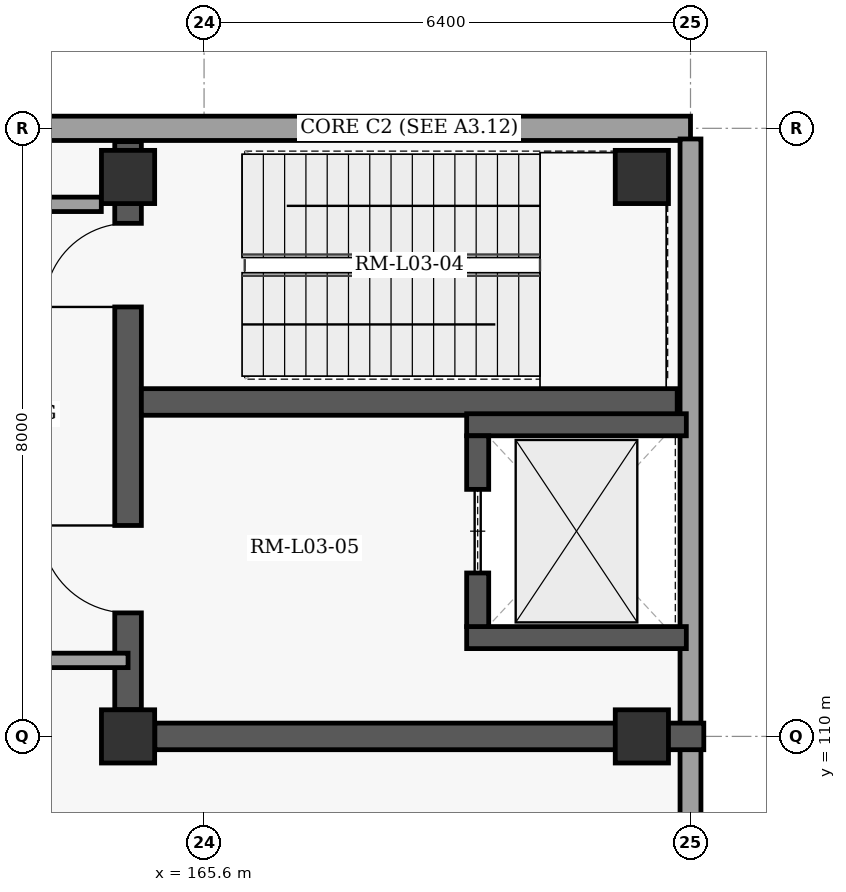
"""IFC4 building model, lengths in metres.
Left out: names, types, materials, properties, quantities, classifications, styles, units other than length and angle.
Written with IfcOpenShell. Run it as: python <this file> out.ifc"""

import sys

from ifc_helpers import new_model, si_unit, direction, frame, frame_2d, origin, origin_2d, place, context, subcontext, project, spatial, rectangle, extrude, element, fill, save


model = new_model("IFC4")
c1 = context("Model", 3, precision=1e-05, world=origin(), true_north=direction((0.0, 1.0)))
c2 = subcontext(c1, "Body", "Model", "MODEL_VIEW")
j1 = project(units=[si_unit("LENGTHUNIT", "METRE"), si_unit("PLANEANGLEUNIT", "RADIAN")], contexts=[c1])
p1 = place(None, origin())
s1 = spatial("IfcSite", under=j1, at=p1, CompositionType="ELEMENT")
p2 = place(p1, origin())
s2 = spatial("IfcBuilding", under=s1, at=p2, CompositionType="ELEMENT")
p3 = place(p2, frame((0.0, 0.0, 15.6)))
s3 = spatial("IfcBuildingStorey", under=s2, at=p3, CompositionType="ELEMENT", Elevation=15.6)
for number, where, z_axis, x_axis in (
    (1, (164.6, 110.0, 0.0), (0.0, 0.0, 1.0), (1.0, 0.0, 0.0)),
    (2, (164.6, 117.36, 0.0), (0.0, 0.0, 1.0), (1.0, 0.0, 0.0)),
    (3, (171.36, 110.0, 0.0), (0.0, 0.0, 1.0), (1.0, 0.0, 0.0)),
    (4, (171.36, 117.36, 0.0), (0.0, 0.0, 1.0), (1.0, 0.0, 0.0)),
):
    element("IfcColumn", number, at=place(p3, frame(where, z_axis=z_axis, x_axis=x_axis)), inside=s3, PredefinedType="COLUMN", context=c2, shape_type="SweptSolid", body=[
        extrude(rectangle(XDim=0.7, YDim=0.7, at=origin_2d()), origin(), (0.0, 0.0, 1.0), 4.8),
    ])
p4 = place(p3, frame((139.6, 118.0, 0.0), z_axis=(0.0, 0.0, 1.0), x_axis=(1.0, 0.0, 0.0)))
e5 = element("IfcWall", 5, at=p4, inside=s3, PredefinedType="SOLIDWALL", context=c2, shape_type="SweptSolid", body=[
    extrude(rectangle(XDim=32.4, YDim=0.32, at=frame_2d((16.2, 0.0))), origin(), (0.0, 0.0, 1.0), 4.58),
])
p5 = place(p4, frame((2.2, 0.0, 0.9)))
e6 = element("IfcOpeningElement", 6, at=p5, cuts=e5, PredefinedType="OPENING", context=c2, shape_type="SweptSolid", body=[
    extrude(rectangle(XDim=2.6, YDim=1.75, at=frame_2d((1.3, 0.875))), frame((0.0, 0.17, 0.0), z_axis=(0.0, -1.0, 0.0), x_axis=(1.0, 0.0, 0.0)), (0.0, 0.0, 1.0), 0.34),
])
p6 = place(p4, frame((7.96, 0.0, 0.9)))
e7 = element("IfcOpeningElement", 7, at=p6, cuts=e5, PredefinedType="OPENING", context=c2, shape_type="SweptSolid", body=[
    extrude(rectangle(XDim=2.8, YDim=1.8, at=frame_2d((1.4, 0.9))), frame((0.0, 0.17, 0.0), z_axis=(0.0, -1.0, 0.0), x_axis=(1.0, 0.0, 0.0)), (0.0, 0.0, 1.0), 0.34),
])
p7 = place(p4, frame((12.97, 0.0, 0.9)))
e8 = element("IfcOpeningElement", 8, at=p7, cuts=e5, PredefinedType="OPENING", context=c2, shape_type="SweptSolid", body=[
    extrude(rectangle(XDim=3.0, YDim=1.8, at=frame_2d((1.5, 0.9))), frame((0.0, 0.17, 0.0), z_axis=(0.0, -1.0, 0.0), x_axis=(1.0, 0.0, 0.0)), (0.0, 0.0, 1.0), 0.34),
])
p8 = place(p4, frame((19.48, 0.0, 0.9)))
e9 = element("IfcOpeningElement", 9, at=p8, cuts=e5, PredefinedType="OPENING", context=c2, shape_type="SweptSolid", body=[
    extrude(rectangle(XDim=1.6, YDim=1.65, at=frame_2d((0.8, 0.825))), frame((0.0, 0.17, 0.0), z_axis=(0.0, -1.0, 0.0), x_axis=(1.0, 0.0, 0.0)), (0.0, 0.0, 1.0), 0.34),
])
p9 = place(p3, frame((172.0, 117.86, 0.0), z_axis=(0.0, 0.0, 1.0), x_axis=(0.0, -1.0, 0.0)))
e10 = element("IfcWall", 10, at=p9, inside=s3, PredefinedType="SOLIDWALL", context=c2, shape_type="SweptSolid", body=[
    extrude(rectangle(XDim=46.12, YDim=0.275, at=frame_2d((23.06, 0.0))), origin(), (0.0, 0.0, 1.0), 4.58),
])
p10 = place(p3, frame((164.952, 110.0, 0.0), z_axis=(0.0, 0.0, 1.0), x_axis=(1.0, 0.0, 0.0)))
e11 = element("IfcWall", 11, at=p10, inside=s3, PredefinedType="SHEAR", context=c2, shape_type="SweptSolid", body=[
    extrude(rectangle(XDim=7.223, YDim=0.35, at=frame_2d((3.612, 0.0))), origin(), (0.0, 0.0, 1.0), 4.58),
])
p11 = place(p3, frame((164.6, 110.352, 0.0), z_axis=(0.0, 0.0, 1.0), x_axis=(0.0, 1.0, 0.0)))
e12 = element("IfcWall", 12, at=p11, inside=s3, PredefinedType="SHEAR", context=c2, shape_type="SweptSolid", body=[
    extrude(rectangle(XDim=7.473, YDim=0.35, at=frame_2d((3.736, 0.0))), origin(), (0.0, 0.0, 1.0), 4.58),
])
p12 = place(p11, frame((5.298, 0.0, 0.0)))
e13 = element("IfcOpeningElement", 13, at=p12, cuts=e12, PredefinedType="OPENING", context=c2, shape_type="SweptSolid", body=[
    extrude(rectangle(XDim=1.1, YDim=2.15, at=frame_2d((0.55, 1.075))), frame((0.0, 0.185, 0.0), z_axis=(0.0, -1.0, 0.0), x_axis=(1.0, 0.0, 0.0)), (0.0, 0.0, 1.0), 0.37),
])
p13 = place(p11, frame((1.273, 0.0, 0.0)))
e14 = element("IfcOpeningElement", 14, at=p13, cuts=e12, PredefinedType="OPENING", context=c2, shape_type="SweptSolid", body=[
    extrude(rectangle(XDim=1.15, YDim=2.2, at=frame_2d((0.575, 1.1))), frame((0.0, 0.185, 0.0), z_axis=(0.0, -1.0, 0.0), x_axis=(1.0, 0.0, 0.0)), (0.0, 0.0, 1.0), 0.37),
])
p14 = place(p3, frame((164.775, 114.4, 0.0), z_axis=(0.0, 0.0, 1.0), x_axis=(1.0, 0.0, 0.0)))
e15 = element("IfcWall", 15, at=p14, inside=s3, PredefinedType="SHEAR", context=c2, shape_type="SweptSolid", body=[
    extrude(rectangle(XDim=7.05, YDim=0.35, at=frame_2d((3.525, 0.0))), origin(), (0.0, 0.0, 1.0), 4.58),
])
for number, where, z_axis, x_axis in (
    (16, (169.055, 111.3, 0.0), (0.0, 0.0, 1.0), (1.0, 0.0, 0.0)),
    (17, (169.055, 114.1, 0.0), (0.0, 0.0, 1.0), (1.0, 0.0, 0.0)),
):
    element("IfcWall", number, at=place(p3, frame(where, z_axis=z_axis, x_axis=x_axis)), inside=s3, PredefinedType="SHEAR", context=c2, shape_type="SweptSolid", body=[
        extrude(rectangle(XDim=2.89, YDim=0.29, at=frame_2d((1.445, 0.0))), origin(), (0.0, 0.0, 1.0), 4.58),
    ])
p15 = place(p3, frame((169.2, 111.445, 0.0), z_axis=(0.0, 0.0, 1.0), x_axis=(0.0, 1.0, 0.0)))
e18 = element("IfcWall", 18, at=p15, inside=s3, PredefinedType="SHEAR", context=c2, shape_type="SweptSolid", body=[
    extrude(rectangle(XDim=2.51, YDim=0.29, at=frame_2d((1.255, 0.0))), origin(), (0.0, 0.0, 1.0), 4.58),
])
p16 = place(p15, frame((0.705, 0.0, 0.0)))
e19 = element("IfcOpeningElement", 19, at=p16, cuts=e18, PredefinedType="OPENING", context=c2, shape_type="SweptSolid", body=[
    extrude(rectangle(XDim=1.1, YDim=2.15, at=frame_2d((0.55, 1.075))), frame((0.0, 0.155, 0.0), z_axis=(0.0, -1.0, 0.0), x_axis=(1.0, 0.0, 0.0)), (0.0, 0.0, 1.0), 0.31),
])
p17 = place(p3, frame((160.105, 111.0, 0.0), z_axis=(0.0, 0.0, 1.0), x_axis=(1.0, 0.0, 0.0)))
e20 = element("IfcWall", 20, at=p17, inside=s3, PredefinedType="PARTITIONING", context=c2, shape_type="SweptSolid", body=[
    extrude(rectangle(XDim=4.495, YDim=0.19, at=frame_2d((2.248, 0.0))), origin(), (0.0, 0.0, 1.0), 4.58),
])
p18 = place(p3, frame((160.105, 117.0, 0.0), z_axis=(0.0, 0.0, 1.0), x_axis=(1.0, 0.0, 0.0)))
e21 = element("IfcWall", 21, at=p18, inside=s3, PredefinedType="PARTITIONING", context=c2, shape_type="SweptSolid", body=[
    extrude(rectangle(XDim=4.143, YDim=0.19, at=frame_2d((2.072, 0.0))), origin(), (0.0, 0.0, 1.0), 3.93),
])
p19 = place(p12, origin())
e22 = element("IfcDoor", 22, at=p19, inside=s3, OperationType="SINGLE_SWING_LEFT", PredefinedType="DOOR", context=c2, shape_type="SweptSolid", body=[
    extrude(rectangle(XDim=1.1, YDim=2.15, at=frame_2d((0.55, 1.075))), frame((0.0, 0.025, 0.0), z_axis=(0.0, -1.0, 0.0), x_axis=(1.0, 0.0, 0.0)), (0.0, 0.0, 1.0), 0.05),
])
fill(e13, e22)
p20 = place(p13, origin())
e23 = element("IfcDoor", 23, at=p20, inside=s3, OperationType="SINGLE_SWING_RIGHT", PredefinedType="DOOR", context=c2, shape_type="SweptSolid", body=[
    extrude(rectangle(XDim=1.15, YDim=2.2, at=frame_2d((0.575, 1.1))), frame((0.0, 0.025, 0.0), z_axis=(0.0, -1.0, 0.0), x_axis=(1.0, 0.0, 0.0)), (0.0, 0.0, 1.0), 0.05),
])
fill(e14, e23)
p21 = place(p16, origin())
e24 = element("IfcDoor", 24, at=p21, inside=s3, OperationType="SLIDING_TO_LEFT", PredefinedType="DOOR", context=c2, shape_type="SweptSolid", body=[
    extrude(rectangle(XDim=1.1, YDim=2.15, at=frame_2d((0.55, 1.075))), frame((0.0, 0.025, 0.0), z_axis=(0.0, -1.0, 0.0), x_axis=(1.0, 0.0, 0.0)), (0.0, 0.0, 1.0), 0.05),
])
fill(e19, e24)
save(model, sys.argv[1])
